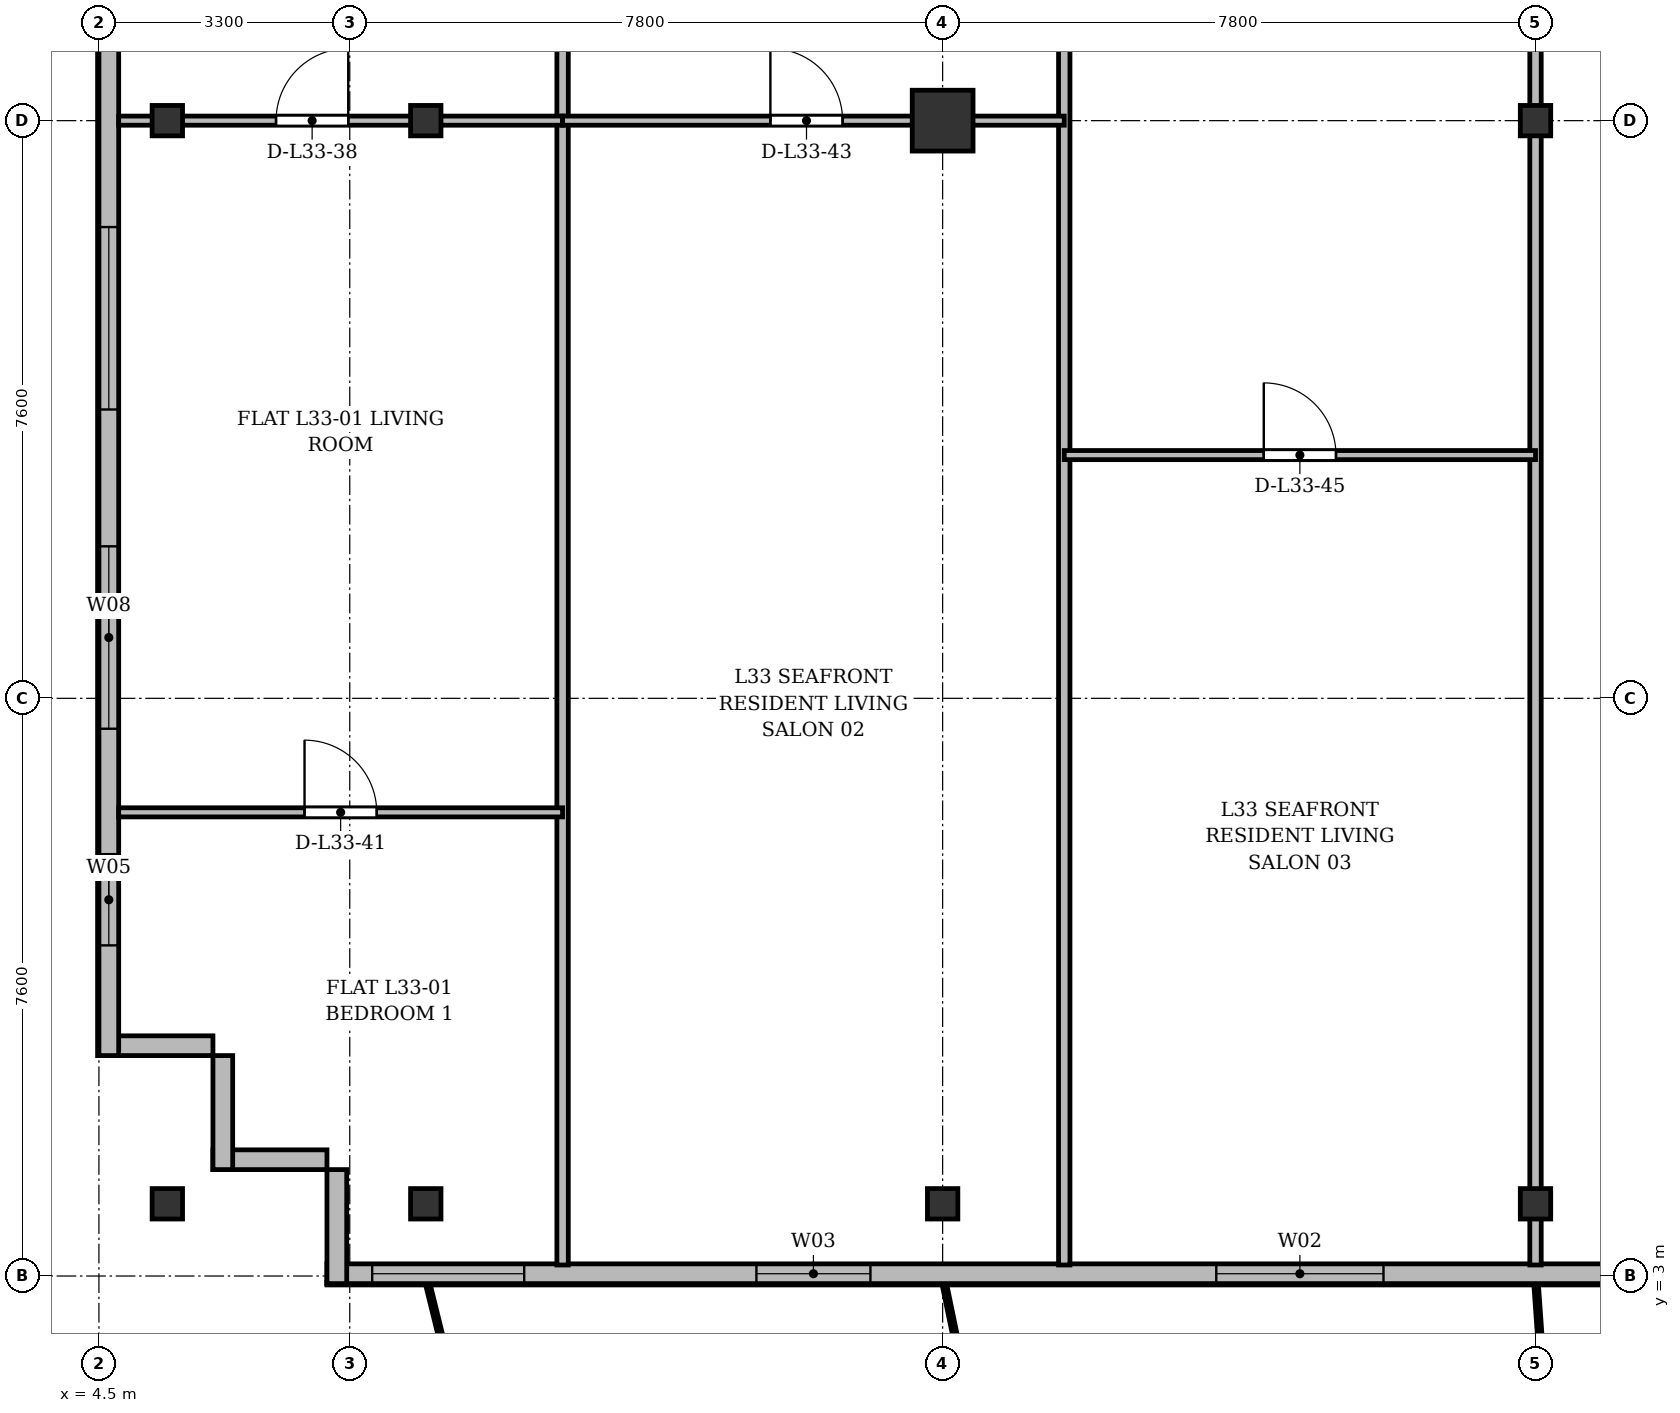
"""IFC4 building model, lengths in metres.
Left out: names, types, materials, properties, quantities, classifications, styles, units other than length and angle.
Written with IfcOpenShell. Run it as: python <this file> out.ifc"""

import sys

from ifc_helpers import new_model, si_unit, direction, frame, frame_2d, origin, origin_2d, place, context, subcontext, project, spatial, rectangle, i_section, extrude, source, transform, mapped, element, fill, save


model = new_model("IFC4")
c1 = context("Model", 3, precision=1e-05, world=origin(), true_north=direction((0.0, 1.0)))
c2 = subcontext(c1, "Body", "Model", "MODEL_VIEW")
j1 = project(units=[si_unit("LENGTHUNIT", "METRE"), si_unit("PLANEANGLEUNIT", "RADIAN")], contexts=[c1])
p1 = place(None, origin())
s1 = spatial("IfcSite", under=j1, at=p1, CompositionType="ELEMENT")
p2 = place(p1, origin())
s2 = spatial("IfcBuilding", under=s1, at=p2, CompositionType="ELEMENT")
p3 = place(p2, frame((0.0, 0.0, 128.5)))
s3 = spatial("IfcBuildingStorey", under=s2, at=p3, CompositionType="ELEMENT", Elevation=128.5)
m1 = source(origin(), c2, "Body", "SweptSolid", [
    extrude(i_section(OverallWidth=0.4, OverallDepth=0.4, WebThickness=0.022, FlangeThickness=0.035, at=origin_2d()), origin(), (0.0, 0.0, 1.0), 3.6),
])
for number, where, z_axis, x_axis in (
    (1, (5.4, 3.95, 0.0), (0.0, 0.0, 1.0), (1.0, 0.0, 0.0)),
    (2, (5.4, 18.2, 0.0), (0.0, 0.0, 1.0), (1.0, 0.0, 0.0)),
    (3, (8.8, 3.95, 0.0), (0.0, 0.0, 1.0), (1.0, 0.0, 0.0)),
    (4, (8.8, 18.2, 0.0), (0.0, 0.0, 1.0), (1.0, 0.0, 0.0)),
    (5, (15.6, 3.95, 0.0), (0.0, 0.0, 1.0), (1.0, 0.0, 0.0)),
):
    element("IfcColumn", number, at=place(p3, frame(where, z_axis=z_axis, x_axis=x_axis)), inside=s3, PredefinedType="COLUMN", context=c2, shape_type="MappedRepresentation", body=[
        mapped(m1, transform((0.0, 0.0, 0.0), x_axis=(1.0, 0.0, 0.0), y_axis=(0.0, 1.0, 0.0), z_axis=(0.0, 0.0, 1.0), scale=1.0)),
    ])
m2 = source(origin(), c2, "Body", "SweptSolid", [
    extrude(rectangle(XDim=0.8, YDim=0.8, at=origin_2d()), origin(), (0.0, 0.0, 1.0), 3.6),
])
p4 = place(p3, frame((15.6, 18.2, 0.0), z_axis=(0.0, 0.0, 1.0), x_axis=(1.0, 0.0, 0.0)))
e6 = element("IfcColumn", 6, at=p4, inside=s3, PredefinedType="COLUMN", context=c2, shape_type="MappedRepresentation", body=[
    mapped(m2, transform((0.0, 0.0, 0.0), x_axis=(1.0, 0.0, 0.0), y_axis=(0.0, 1.0, 0.0), z_axis=(0.0, 0.0, 1.0), scale=1.0)),
])
for number, where, z_axis, x_axis in (
    (7, (23.4, 3.95, 0.0), (0.0, 0.0, 1.0), (1.0, 0.0, 0.0)),
    (8, (23.4, 18.2, 0.0), (0.0, 0.0, 1.0), (1.0, 0.0, 0.0)),
):
    element("IfcColumn", number, at=place(p3, frame(where, z_axis=z_axis, x_axis=x_axis)), inside=s3, PredefinedType="COLUMN", context=c2, shape_type="MappedRepresentation", body=[
        mapped(m1, transform((0.0, 0.0, 0.0), x_axis=(1.0, 0.0, 0.0), y_axis=(0.0, 1.0, 0.0), z_axis=(0.0, 0.0, 1.0), scale=1.0)),
    ])
for number, where, z_axis, x_axis in (
    (9, (7.5, 4.53, 0.0), (0.0, 0.0, 1.0), (-1.0, 0.0, 0.0)),
    (10, (6.13, 4.4, 0.0), (0.0, 0.0, 1.0), (0.0, 1.0, 0.0)),
):
    element("IfcWall", number, at=place(p3, frame(where, z_axis=z_axis, x_axis=x_axis)), inside=s3, PredefinedType="SOLIDWALL", context=c2, shape_type="SweptSolid", body=[
        extrude(rectangle(XDim=1.5, YDim=0.26, at=frame_2d((0.75, 0.0))), origin(), (0.0, 0.0, 1.0), 3.22),
    ])
p5 = place(p3, frame((6.0, 6.03, 0.0), z_axis=(0.0, 0.0, 1.0), x_axis=(-1.0, 0.0, 0.0)))
e11 = element("IfcWall", 11, at=p5, inside=s3, PredefinedType="SOLIDWALL", context=c2, shape_type="SweptSolid", body=[
    extrude(rectangle(XDim=1.5, YDim=0.26, at=frame_2d((0.75, 0.0))), origin(), (0.0, 0.0, 1.0), 2.72),
])
p6 = place(p3, frame((4.63, 5.9, 0.0), z_axis=(0.0, 0.0, 1.0), x_axis=(0.0, 1.0, 0.0)))
e12 = element("IfcWall", 12, at=p6, inside=s3, PredefinedType="SOLIDWALL", context=c2, shape_type="SweptSolid", body=[
    extrude(rectangle(XDim=39.6, YDim=0.26, at=frame_2d((19.8, 0.0))), origin(), (0.0, 0.0, 1.0), 2.632),
])
p7 = place(p6, frame((1.45, 0.0, 0.92)))
e13 = element("IfcOpeningElement", 13, at=p7, cuts=e12, PredefinedType="OPENING", context=c2, shape_type="SweptSolid", body=[
    extrude(rectangle(XDim=1.2, YDim=1.61, at=frame_2d((0.6, 0.805))), frame((0.0, 0.14, 0.0), z_axis=(0.0, -1.0, 0.0), x_axis=(1.0, 0.0, 0.0)), (0.0, 0.0, 1.0), 0.28),
])
p8 = place(p6, frame((4.3, 0.0, 0.92)))
e14 = element("IfcOpeningElement", 14, at=p8, cuts=e12, PredefinedType="OPENING", context=c2, shape_type="SweptSolid", body=[
    extrude(rectangle(XDim=2.4, YDim=1.61, at=frame_2d((1.2, 0.805))), frame((0.0, 0.14, 0.0), z_axis=(0.0, -1.0, 0.0), x_axis=(1.0, 0.0, 0.0)), (0.0, 0.0, 1.0), 0.28),
])
p9 = place(p6, frame((8.5, 0.0, 0.92)))
e15 = element("IfcOpeningElement", 15, at=p9, cuts=e12, PredefinedType="OPENING", context=c2, shape_type="SweptSolid", body=[
    extrude(rectangle(XDim=2.4, YDim=1.61, at=frame_2d((1.2, 0.805))), frame((0.0, 0.14, 0.0), z_axis=(0.0, -1.0, 0.0), x_axis=(1.0, 0.0, 0.0)), (0.0, 0.0, 1.0), 0.28),
])
p10 = place(p6, frame((29.7, 0.0, 0.92)))
e16 = element("IfcOpeningElement", 16, at=p10, cuts=e12, PredefinedType="OPENING", context=c2, shape_type="SweptSolid", body=[
    extrude(rectangle(XDim=2.4, YDim=1.61, at=frame_2d((1.2, 0.805))), frame((0.0, 0.14, 0.0), z_axis=(0.0, -1.0, 0.0), x_axis=(1.0, 0.0, 0.0)), (0.0, 0.0, 1.0), 0.28),
])
p11 = place(p6, frame((37.25, 0.0, 0.92)))
e17 = element("IfcOpeningElement", 17, at=p11, cuts=e12, PredefinedType="OPENING", context=c2, shape_type="SweptSolid", body=[
    extrude(rectangle(XDim=1.2, YDim=1.61, at=frame_2d((0.6, 0.805))), frame((0.0, 0.14, 0.0), z_axis=(0.0, -1.0, 0.0), x_axis=(1.0, 0.0, 0.0)), (0.0, 0.0, 1.0), 0.28),
])
p12 = place(p3, frame((44.8, 3.03, 0.0), z_axis=(0.0, 0.0, 1.0), x_axis=(-1.0, 0.0, 0.0)))
e18 = element("IfcWall", 18, at=p12, inside=s3, PredefinedType="SOLIDWALL", context=c2, shape_type="SweptSolid", body=[
    extrude(rectangle(XDim=37.3, YDim=0.26, at=frame_2d((18.65, 0.0))), origin(), (0.0, 0.0, 1.0), 3.22),
])
p13 = place(p12, frame((6.775, 0.0, 0.9)))
e19 = element("IfcOpeningElement", 19, at=p13, cuts=e18, PredefinedType="OPENING", context=c2, shape_type="SweptSolid", body=[
    extrude(rectangle(XDim=1.65, YDim=1.85, at=frame_2d((0.825, 0.925))), frame((0.0, 0.14, 0.0), z_axis=(0.0, -1.0, 0.0), x_axis=(1.0, 0.0, 0.0)), (0.0, 0.0, 1.0), 0.28),
])
p14 = place(p12, frame((16.9, 0.0, 0.9)))
e20 = element("IfcOpeningElement", 20, at=p14, cuts=e18, PredefinedType="OPENING", context=c2, shape_type="SweptSolid", body=[
    extrude(rectangle(XDim=1.8, YDim=1.8, at=frame_2d((0.9, 0.9))), frame((0.0, 0.14, 0.0), z_axis=(0.0, -1.0, 0.0), x_axis=(1.0, 0.0, 0.0)), (0.0, 0.0, 1.0), 0.28),
])
p15 = place(p12, frame((23.4, 0.0, 0.9)))
e21 = element("IfcOpeningElement", 21, at=p15, cuts=e18, PredefinedType="OPENING", context=c2, shape_type="SweptSolid", body=[
    extrude(rectangle(XDim=2.2, YDim=1.8, at=frame_2d((1.1, 0.9))), frame((0.0, 0.14, 0.0), z_axis=(0.0, -1.0, 0.0), x_axis=(1.0, 0.0, 0.0)), (0.0, 0.0, 1.0), 0.28),
])
p16 = place(p12, frame((30.15, 0.0, 0.9)))
e22 = element("IfcOpeningElement", 22, at=p16, cuts=e18, PredefinedType="OPENING", context=c2, shape_type="SweptSolid", body=[
    extrude(rectangle(XDim=1.5, YDim=1.75, at=frame_2d((0.75, 0.875))), frame((0.0, 0.14, 0.0), z_axis=(0.0, -1.0, 0.0), x_axis=(1.0, 0.0, 0.0)), (0.0, 0.0, 1.0), 0.28),
])
p17 = place(p12, frame((34.705, 0.0, 0.9)))
e23 = element("IfcOpeningElement", 23, at=p17, cuts=e18, PredefinedType="OPENING", context=c2, shape_type="SweptSolid", body=[
    extrude(rectangle(XDim=2.0, YDim=1.95, at=frame_2d((1.0, 0.975))), frame((0.0, 0.14, 0.0), z_axis=(0.0, -1.0, 0.0), x_axis=(1.0, 0.0, 0.0)), (0.0, 0.0, 1.0), 0.28),
])
p18 = place(p3, frame((7.63, 2.9, 0.0), z_axis=(0.0, 0.0, 1.0), x_axis=(0.0, 1.0, 0.0)))
e24 = element("IfcWall", 24, at=p18, inside=s3, PredefinedType="SOLIDWALL", context=c2, shape_type="SweptSolid", body=[
    extrude(rectangle(XDim=1.5, YDim=0.26, at=frame_2d((0.75, 0.0))), origin(), (0.0, 0.0, 1.0), 2.632),
])
for number, where, z_axis, x_axis in (
    (25, (10.6, 3.145, 0.0), (0.0, 0.0, 1.0), (0.0, 1.0, 0.0)),
    (26, (17.2, 3.145, 0.0), (0.0, 0.0, 1.0), (0.0, 1.0, 0.0)),
):
    element("IfcWall", number, at=place(p3, frame(where, z_axis=z_axis, x_axis=x_axis)), inside=s3, PredefinedType="PARTITIONING", context=c2, shape_type="SweptSolid", body=[
        extrude(rectangle(XDim=24.455, YDim=0.15, at=frame_2d((12.228, 0.0))), origin(), (0.0, 0.0, 1.0), 2.632),
    ])
p19 = place(p3, frame((23.4, 3.145, 0.0), z_axis=(0.0, 0.0, 1.0), x_axis=(0.0, 1.0, 0.0)))
e27 = element("IfcWall", 27, at=p19, inside=s3, PredefinedType="PARTITIONING", context=c2, shape_type="SweptSolid", body=[
    extrude(rectangle(XDim=24.455, YDim=0.15, at=frame_2d((12.228, 0.0))), origin(), (0.0, 0.0, 1.0), 2.72),
])
p20 = place(p3, frame((4.76, 18.2, 0.0), z_axis=(0.0, 0.0, 1.0), x_axis=(1.0, 0.0, 0.0)))
e28 = element("IfcWall", 28, at=p20, inside=s3, PredefinedType="PARTITIONING", context=c2, shape_type="SweptSolid", body=[
    extrude(rectangle(XDim=5.84, YDim=0.12, at=frame_2d((2.92, 0.0))), origin(), (0.0, 0.0, 1.0), 2.632),
])
p21 = place(p20, frame((2.07, 0.0, 0.0)))
e29 = element("IfcOpeningElement", 29, at=p21, cuts=e28, PredefinedType="OPENING", context=c2, shape_type="SweptSolid", body=[
    extrude(rectangle(XDim=0.95, YDim=2.15, at=frame_2d((0.475, 1.075))), frame((0.0, 0.07, 0.0), z_axis=(0.0, -1.0, 0.0), x_axis=(1.0, 0.0, 0.0)), (0.0, 0.0, 1.0), 0.14),
])
p22 = place(p3, frame((4.76, 9.1, 0.0), z_axis=(0.0, 0.0, 1.0), x_axis=(1.0, 0.0, 0.0)))
e30 = element("IfcWall", 30, at=p22, inside=s3, PredefinedType="PARTITIONING", context=c2, shape_type="SweptSolid", body=[
    extrude(rectangle(XDim=5.84, YDim=0.12, at=frame_2d((2.92, 0.0))), origin(), (0.0, 0.0, 1.0), 2.72),
])
p23 = place(p22, frame((2.445, 0.0, 0.0)))
e31 = element("IfcOpeningElement", 31, at=p23, cuts=e30, PredefinedType="OPENING", context=c2, shape_type="SweptSolid", body=[
    extrude(rectangle(XDim=0.95, YDim=2.15, at=frame_2d((0.475, 1.075))), frame((0.0, 0.07, 0.0), z_axis=(0.0, -1.0, 0.0), x_axis=(1.0, 0.0, 0.0)), (0.0, 0.0, 1.0), 0.14),
])
p24 = place(p3, frame((10.6, 18.2, 0.0), z_axis=(0.0, 0.0, 1.0), x_axis=(1.0, 0.0, 0.0)))
e32 = element("IfcWall", 32, at=p24, inside=s3, PredefinedType="PARTITIONING", context=c2, shape_type="SweptSolid", body=[
    extrude(rectangle(XDim=6.6, YDim=0.12, at=frame_2d((3.3, 0.0))), origin(), (0.0, 0.0, 1.0), 2.632),
])
p25 = place(p24, frame((2.734, 0.0, 0.0)))
e33 = element("IfcOpeningElement", 33, at=p25, cuts=e32, PredefinedType="OPENING", context=c2, shape_type="SweptSolid", body=[
    extrude(rectangle(XDim=0.95, YDim=2.15, at=frame_2d((0.475, 1.075))), frame((0.0, 0.07, 0.0), z_axis=(0.0, -1.0, 0.0), x_axis=(1.0, 0.0, 0.0)), (0.0, 0.0, 1.0), 0.14),
])
p26 = place(p3, frame((17.2, 13.8, 0.0), z_axis=(0.0, 0.0, 1.0), x_axis=(1.0, 0.0, 0.0)))
e34 = element("IfcWall", 34, at=p26, inside=s3, PredefinedType="PARTITIONING", context=c2, shape_type="SweptSolid", body=[
    extrude(rectangle(XDim=6.2, YDim=0.12, at=frame_2d((3.1, 0.0))), origin(), (0.0, 0.0, 1.0), 2.72),
])
p27 = place(p26, frame((2.625, 0.0, 0.0)))
e35 = element("IfcOpeningElement", 35, at=p27, cuts=e34, PredefinedType="OPENING", context=c2, shape_type="SweptSolid", body=[
    extrude(rectangle(XDim=0.95, YDim=2.15, at=frame_2d((0.475, 1.075))), frame((0.0, 0.07, 0.0), z_axis=(0.0, -1.0, 0.0), x_axis=(1.0, 0.0, 0.0)), (0.0, 0.0, 1.0), 0.14),
])
m3 = source(origin(), c2, "Body", "SweptSolid", [
    extrude(rectangle(XDim=1.2, YDim=1.61, at=frame_2d((0.6, 0.805))), frame((0.0, 0.03, 0.0), z_axis=(0.0, -1.0, 0.0), x_axis=(1.0, 0.0, 0.0)), (0.0, 0.0, 1.0), 0.06),
])
p28 = place(p7, origin())
e36 = element("IfcWindow", 36, at=p28, inside=s3, PartitioningType="SINGLE_PANEL", PredefinedType="WINDOW", context=c2, shape_type="MappedRepresentation", body=[
    mapped(m3, transform((0.0, 0.0, 0.0), x_axis=(1.0, 0.0, 0.0), y_axis=(0.0, 1.0, 0.0), z_axis=(0.0, 0.0, 1.0), scale=1.0)),
])
fill(e13, e36)
m4 = source(origin(), c2, "Body", "SweptSolid", [
    extrude(rectangle(XDim=2.4, YDim=1.61, at=frame_2d((1.2, 0.805))), frame((0.0, 0.03, 0.0), z_axis=(0.0, -1.0, 0.0), x_axis=(1.0, 0.0, 0.0)), (0.0, 0.0, 1.0), 0.06),
])
p29 = place(p8, origin())
e37 = element("IfcWindow", 37, at=p29, inside=s3, PartitioningType="SINGLE_PANEL", PredefinedType="WINDOW", context=c2, shape_type="MappedRepresentation", body=[
    mapped(m4, transform((0.0, 0.0, 0.0), x_axis=(1.0, 0.0, 0.0), y_axis=(0.0, 1.0, 0.0), z_axis=(0.0, 0.0, 1.0), scale=1.0)),
])
fill(e14, e37)
p30 = place(p9, origin())
e38 = element("IfcWindow", 38, at=p30, inside=s3, PartitioningType="SINGLE_PANEL", PredefinedType="WINDOW", context=c2, shape_type="MappedRepresentation", body=[
    mapped(m4, transform((0.0, 0.0, 0.0), x_axis=(1.0, 0.0, 0.0), y_axis=(0.0, 1.0, 0.0), z_axis=(0.0, 0.0, 1.0), scale=1.0)),
])
fill(e15, e38)
m5 = source(origin(), c2, "Body", "SweptSolid", [
    extrude(rectangle(XDim=2.2, YDim=1.8, at=frame_2d((1.1, 0.9))), frame((0.0, 0.03, 0.0), z_axis=(0.0, -1.0, 0.0), x_axis=(1.0, 0.0, 0.0)), (0.0, 0.0, 1.0), 0.06),
])
p31 = place(p15, origin())
e39 = element("IfcWindow", 39, at=p31, inside=s3, PartitioningType="SINGLE_PANEL", PredefinedType="WINDOW", context=c2, shape_type="MappedRepresentation", body=[
    mapped(m5, transform((0.0, 0.0, 0.0), x_axis=(1.0, 0.0, 0.0), y_axis=(0.0, 1.0, 0.0), z_axis=(0.0, 0.0, 1.0), scale=1.0)),
])
fill(e21, e39)
m6 = source(origin(), c2, "Body", "SweptSolid", [
    extrude(rectangle(XDim=1.5, YDim=1.75, at=frame_2d((0.75, 0.875))), frame((0.0, 0.03, 0.0), z_axis=(0.0, -1.0, 0.0), x_axis=(1.0, 0.0, 0.0)), (0.0, 0.0, 1.0), 0.06),
])
p32 = place(p16, origin())
e40 = element("IfcWindow", 40, at=p32, inside=s3, PartitioningType="SINGLE_PANEL", PredefinedType="WINDOW", context=c2, shape_type="MappedRepresentation", body=[
    mapped(m6, transform((0.0, 0.0, 0.0), x_axis=(1.0, 0.0, 0.0), y_axis=(0.0, 1.0, 0.0), z_axis=(0.0, 0.0, 1.0), scale=1.0)),
])
fill(e22, e40)
m7 = source(origin(), c2, "Body", "SweptSolid", [
    extrude(rectangle(XDim=2.0, YDim=1.95, at=frame_2d((1.0, 0.975))), frame((0.0, 0.03, 0.0), z_axis=(0.0, -1.0, 0.0), x_axis=(1.0, 0.0, 0.0)), (0.0, 0.0, 1.0), 0.06),
])
p33 = place(p17, origin())
e41 = element("IfcWindow", 41, at=p33, inside=s3, PartitioningType="SINGLE_PANEL", PredefinedType="WINDOW", context=c2, shape_type="MappedRepresentation", body=[
    mapped(m7, transform((0.0, 0.0, 0.0), x_axis=(1.0, 0.0, 0.0), y_axis=(0.0, 1.0, 0.0), z_axis=(0.0, 0.0, 1.0), scale=1.0)),
])
fill(e23, e41)
m8 = source(origin(), c2, "Body", "SweptSolid", [
    extrude(rectangle(XDim=0.95, YDim=2.15, at=frame_2d((0.475, 1.075))), frame((0.0, 0.025, 0.0), z_axis=(0.0, -1.0, 0.0), x_axis=(1.0, 0.0, 0.0)), (0.0, 0.0, 1.0), 0.05),
])
p34 = place(p21, origin())
e42 = element("IfcDoor", 42, at=p34, inside=s3, OperationType="SINGLE_SWING_RIGHT", PredefinedType="DOOR", context=c2, shape_type="MappedRepresentation", body=[
    mapped(m8, transform((0.0, 0.0, 0.0), x_axis=(1.0, 0.0, 0.0), y_axis=(0.0, 1.0, 0.0), z_axis=(0.0, 0.0, 1.0), scale=1.0)),
])
fill(e29, e42)
p35 = place(p23, origin())
e43 = element("IfcDoor", 43, at=p35, inside=s3, OperationType="SINGLE_SWING_LEFT", PredefinedType="DOOR", context=c2, shape_type="MappedRepresentation", body=[
    mapped(m8, transform((0.0, 0.0, 0.0), x_axis=(1.0, 0.0, 0.0), y_axis=(0.0, 1.0, 0.0), z_axis=(0.0, 0.0, 1.0), scale=1.0)),
])
fill(e31, e43)
p36 = place(p25, origin())
e44 = element("IfcDoor", 44, at=p36, inside=s3, OperationType="SINGLE_SWING_LEFT", PredefinedType="DOOR", context=c2, shape_type="MappedRepresentation", body=[
    mapped(m8, transform((0.0, 0.0, 0.0), x_axis=(1.0, 0.0, 0.0), y_axis=(0.0, 1.0, 0.0), z_axis=(0.0, 0.0, 1.0), scale=1.0)),
])
fill(e33, e44)
p37 = place(p27, origin())
e45 = element("IfcDoor", 45, at=p37, inside=s3, OperationType="SINGLE_SWING_LEFT", PredefinedType="DOOR", context=c2, shape_type="MappedRepresentation", body=[
    mapped(m8, transform((0.0, 0.0, 0.0), x_axis=(1.0, 0.0, 0.0), y_axis=(0.0, 1.0, 0.0), z_axis=(0.0, 0.0, 1.0), scale=1.0)),
])
fill(e35, e45)
save(model, sys.argv[1])
